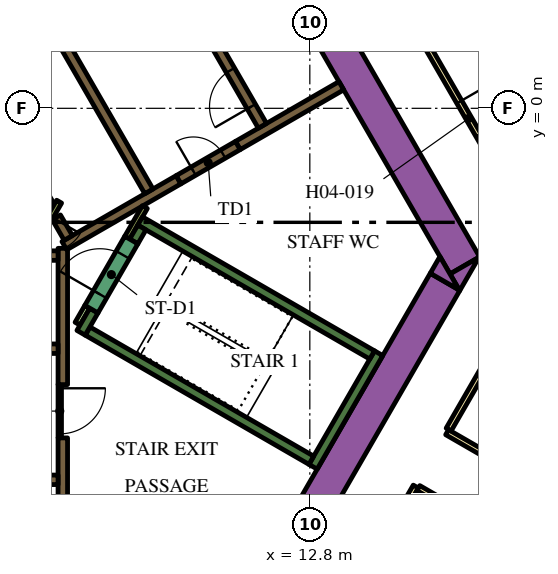
"""IFC4 building model, lengths in metres.
Left out: names, types, materials, properties, quantities, classifications, styles, units other than length and angle.
Written with IfcOpenShell. Run it as: python <this file> out.ifc"""

import sys

from ifc_helpers import new_model, si_unit, direction, frame, frame_2d, origin, place, context, subcontext, project, spatial, polyline, rectangle, outline, extrude, element, fill, save


model = new_model("IFC4")
c1 = context("Model", 3, precision=1e-05, world=origin(), true_north=direction((0.0, 1.0)))
c2 = subcontext(c1, "Body", "Model", "MODEL_VIEW")
j1 = project(units=[si_unit("LENGTHUNIT", "METRE"), si_unit("PLANEANGLEUNIT", "RADIAN")], contexts=[c1])
p1 = place(None, origin())
s1 = spatial("IfcSite", under=j1, at=p1, CompositionType="ELEMENT")
p2 = place(p1, origin())
s2 = spatial("IfcBuilding", under=s1, at=p2, CompositionType="ELEMENT")
p3 = place(p2, frame((0.0, 0.0, 70.5)))
s3 = spatial("IfcBuildingStorey", under=s2, at=p3, CompositionType="ELEMENT", Elevation=70.5)
p4 = place(p3, frame((6.461, 13.909, 0.0), z_axis=(0.0, 0.0, 1.0), x_axis=(0.500005804227, -0.866022052686, 0.0)))
e1 = element("IfcWall", 1, at=p4, inside=s3, PredefinedType="SOLIDWALL", context=c2, shape_type="SweptSolid", body=[
    extrude(rectangle(XDim=20.834, YDim=0.9, at=frame_2d((10.417, 0.0))), origin(), (0.0, 0.0, 1.0), 3.9),
])
p5 = place(p3, origin())
e2 = element("IfcWall", 2, at=p5, inside=s3, PredefinedType="SOLIDWALL", context=c2, shape_type="SweptSolid", body=[
    extrude(outline(polyline([(16.743, -4.8), (16.489, -4.36), (17.251, -3.92), (16.743, -4.8)])), origin(), (0.0, 0.0, 1.0), 3.9),
])
p6 = place(p3, frame((11.695, -12.644, 0.0), z_axis=(0.0, 0.0, 1.0), x_axis=(0.500010229568, 0.86601949766, 0.0)))
e3 = element("IfcWall", 3, at=p6, inside=s3, PredefinedType="SOLIDWALL", context=c2, shape_type="SweptSolid", body=[
    extrude(rectangle(XDim=9.326, YDim=0.9, at=frame_2d((4.663, 0.0))), origin(), (0.0, 0.0, 1.0), 3.9),
])
e4 = element("IfcWall", 4, at=p5, inside=s3, PredefinedType="SOLIDWALL", context=c2, shape_type="SweptSolid", body=[
    extrude(outline(polyline([(16.223, -3.9), (16.732, -4.78), (15.969, -4.34), (16.223, -3.9)])), origin(), (0.0, 0.0, 1.0), 3.9),
])
p7 = place(p3, frame((12.885, -9.431, 0.0), z_axis=(0.0, 0.0, 1.0), x_axis=(0.500020560727, 0.866013532718, 0.0)))
e5 = element("IfcWall", 5, at=p7, inside=s3, PredefinedType="SOLIDWALL", context=c2, shape_type="SweptSolid", body=[
    extrude(rectangle(XDim=3.45, YDim=0.25, at=frame_2d((1.725, 0.0))), origin(), (0.0, 0.0, 1.0), 3.9),
])
p8 = place(p3, frame((12.84, -9.261, 0.0), z_axis=(0.0, 0.0, 1.0), x_axis=(-0.866013990052, 0.500019768644, 0.0)))
e6 = element("IfcWall", 6, at=p8, inside=s3, PredefinedType="SOLIDWALL", context=c2, shape_type="SweptSolid", body=[
    extrude(rectangle(XDim=6.8, YDim=0.25, at=frame_2d((3.4, 0.0))), origin(), (0.0, 0.0, 1.0), 3.9),
])
p9 = place(p3, frame((6.78, -5.906, 0.0), z_axis=(0.0, 0.0, 1.0), x_axis=(0.500223362819, 0.865896406789, 0.0)))
e7 = element("IfcWall", 7, at=p9, inside=s3, PredefinedType="SOLIDWALL", context=c2, shape_type="SweptSolid", body=[
    extrude(rectangle(XDim=0.675, YDim=0.25, at=frame_2d((0.337, 0.0))), origin(), (0.0, 0.0, 1.0), 3.9),
])
p10 = place(p3, frame((8.334, -2.964, 0.0), z_axis=(0.0, 0.0, 1.0), x_axis=(0.866016039709, -0.500016218704, 0.0)))
e8 = element("IfcWall", 8, at=p10, inside=s3, PredefinedType="SOLIDWALL", context=c2, shape_type="SweptSolid", body=[
    extrude(rectangle(XDim=7.05, YDim=0.25, at=frame_2d((3.525, 0.0))), origin(), (0.0, 0.0, 1.0), 3.9),
])
p11 = place(p3, frame((8.168, -3.503, 0.0), z_axis=(0.0, 0.0, 1.0), x_axis=(0.49972245349, 0.866185586049, 0.0)))
e9 = element("IfcWall", 9, at=p11, inside=s3, PredefinedType="SOLIDWALL", context=c2, shape_type="SweptSolid", body=[
    extrude(rectangle(XDim=0.425, YDim=0.25, at=frame_2d((0.212, 0.0))), origin(), (0.0, 0.0, 1.0), 3.9),
])
p12 = place(p3, frame((6.3, -7.27, 0.0), z_axis=(0.0, 0.0, 1.0), x_axis=(0.0, 1.0, 0.0)))
e10 = element("IfcWall", 10, at=p12, inside=s3, PredefinedType="SOLIDWALL", context=c2, shape_type="SweptSolid", body=[
    extrude(rectangle(XDim=3.586, YDim=0.25, at=frame_2d((1.793, 0.0))), origin(), (0.0, 0.0, 1.0), 3.9),
])
p13 = place(p3, frame((6.3, -12.1, 0.0), z_axis=(0.0, 0.0, 1.0), x_axis=(0.0, 1.0, 0.0)))
e11 = element("IfcWall", 11, at=p13, inside=s3, PredefinedType="SOLIDWALL", context=c2, shape_type="SweptSolid", body=[
    extrude(rectangle(XDim=3.428, YDim=0.25, at=frame_2d((1.714, 0.0))), origin(), (0.0, 0.0, 1.0), 3.9),
])
p14 = place(p3, frame((5.538, -3.875, 0.0), z_axis=(0.0, 0.0, 1.0), x_axis=(1.0, 0.0, 0.0)))
e12 = element("IfcWall", 12, at=p14, inside=s3, PredefinedType="SOLIDWALL", context=c2, shape_type="SweptSolid", body=[
    extrude(rectangle(XDim=0.637, YDim=0.25, at=frame_2d((0.318, 0.0))), origin(), (0.0, 0.0, 1.0), 3.9),
])
p15 = place(p3, frame((13.629, 0.594, 0.0), z_axis=(0.0, 0.0, 1.0), x_axis=(-0.86602790099, -0.499995674689, 0.0)))
e13 = element("IfcWall", 13, at=p15, inside=s3, PredefinedType="SOLIDWALL", context=c2, shape_type="SweptSolid", body=[
    extrude(rectangle(XDim=3.146, YDim=0.25, at=frame_2d((1.573, 0.0))), origin(), (0.0, 0.0, 1.0), 3.9),
])
p16 = place(p3, frame((9.346, -1.879, 0.0), z_axis=(0.0, 0.0, 1.0), x_axis=(-0.866048528039, -0.499959945477, 0.0)))
e14 = element("IfcWall", 14, at=p16, inside=s3, PredefinedType="SOLIDWALL", context=c2, shape_type="SweptSolid", body=[
    extrude(rectangle(XDim=3.47, YDim=0.25, at=frame_2d((1.735, 0.0))), origin(), (0.0, 0.0, 1.0), 3.9),
])
p17 = place(p3, frame((6.13, -2.867, 0.0), z_axis=(0.0, 0.0, 1.0), x_axis=(0.500160776593, -0.865932559475, 0.0)))
e15 = element("IfcWall", 15, at=p17, inside=s3, PredefinedType="SOLIDWALL", context=c2, shape_type="SweptSolid", body=[
    extrude(rectangle(XDim=0.627, YDim=0.25, at=frame_2d((0.313, 0.0))), origin(), (0.0, 0.0, 1.0), 3.9),
])
p18 = place(p3, frame((5.97, -2.591, 0.0), z_axis=(0.0, 0.0, 1.0), x_axis=(-0.499994469932, 0.866028596547, 0.0)))
e16 = element("IfcWall", 16, at=p18, inside=s3, PredefinedType="SOLIDWALL", context=c2, shape_type="SweptSolid", body=[
    extrude(rectangle(XDim=10.488, YDim=0.25, at=frame_2d((5.244, 0.0))), origin(), (0.0, 0.0, 1.0), 3.9),
])
p19 = place(p3, frame((6.945, -5.222, 0.0), z_axis=(0.0, 0.0, 1.0), x_axis=(-0.499818422106, -0.866130212453, 0.0)))
e17 = element("IfcWall", 17, at=p19, inside=s3, PredefinedType="PARTITIONING", context=c2, shape_type="SweptSolid", body=[
    extrude(rectangle(XDim=0.514, YDim=0.15, at=frame_2d((0.257, 0.0))), origin(), (0.0, 0.0, 1.0), 2.75),
])
p20 = place(p3, frame((8.459, -2.599, 0.0), z_axis=(0.0, 0.0, 1.0), x_axis=(-0.500041054325, -0.866001699761, 0.0)))
e18 = element("IfcWall", 18, at=p20, inside=s3, PredefinedType="PARTITIONING", context=c2, shape_type="SweptSolid", body=[
    extrude(rectangle(XDim=0.929, YDim=0.15, at=frame_2d((0.464, 0.0))), origin(), (0.0, 0.0, 1.0), 3.9),
])
p21 = place(p3, frame((-6.175, -9.775, 0.0), z_axis=(0.0, 0.0, 1.0), x_axis=(1.0, 0.0, 0.0)))
e19 = element("IfcWall", 19, at=p21, inside=s3, PredefinedType="SOLIDWALL", context=c2, shape_type="SweptSolid", body=[
    extrude(rectangle(XDim=12.35, YDim=0.25, at=frame_2d((6.175, 0.0))), origin(), (0.0, 0.0, 1.0), 3.9),
])
p22 = place(p21, frame((0.585, 0.0, 0.0)))
e20 = element("IfcOpeningElement", 20, at=p22, cuts=e19, PredefinedType="OPENING", context=c2, shape_type="SweptSolid", body=[
    extrude(rectangle(XDim=1.1, YDim=2.1, at=frame_2d((0.55, 1.05))), frame((0.0, 0.135, 0.0), z_axis=(0.0, -1.0, 0.0), x_axis=(1.0, 0.0, 0.0)), (0.0, 0.0, 1.0), 0.27),
])
p23 = place(p21, frame((3.105, 0.0, 0.0)))
e21 = element("IfcOpeningElement", 21, at=p23, cuts=e19, PredefinedType="OPENING", context=c2, shape_type="SweptSolid", body=[
    extrude(rectangle(XDim=1.1, YDim=2.1, at=frame_2d((0.55, 1.05))), frame((0.0, 0.135, 0.0), z_axis=(0.0, -1.0, 0.0), x_axis=(1.0, 0.0, 0.0)), (0.0, 0.0, 1.0), 0.27),
])
p24 = place(p21, frame((5.625, 0.0, 0.0)))
e22 = element("IfcOpeningElement", 22, at=p24, cuts=e19, PredefinedType="OPENING", context=c2, shape_type="SweptSolid", body=[
    extrude(rectangle(XDim=1.1, YDim=2.1, at=frame_2d((0.55, 1.05))), frame((0.0, 0.135, 0.0), z_axis=(0.0, -1.0, 0.0), x_axis=(1.0, 0.0, 0.0)), (0.0, 0.0, 1.0), 0.27),
])
p25 = place(p21, frame((8.145, 0.0, 0.0)))
e23 = element("IfcOpeningElement", 23, at=p25, cuts=e19, PredefinedType="OPENING", context=c2, shape_type="SweptSolid", body=[
    extrude(rectangle(XDim=1.1, YDim=2.1, at=frame_2d((0.55, 1.05))), frame((0.0, 0.135, 0.0), z_axis=(0.0, -1.0, 0.0), x_axis=(1.0, 0.0, 0.0)), (0.0, 0.0, 1.0), 0.27),
])
p26 = place(p21, frame((10.665, 0.0, 0.0)))
e24 = element("IfcOpeningElement", 24, at=p26, cuts=e19, PredefinedType="OPENING", context=c2, shape_type="SweptSolid", body=[
    extrude(rectangle(XDim=1.1, YDim=2.1, at=frame_2d((0.55, 1.05))), frame((0.0, 0.135, 0.0), z_axis=(0.0, -1.0, 0.0), x_axis=(1.0, 0.0, 0.0)), (0.0, 0.0, 1.0), 0.27),
])
p27 = place(p3, frame((-6.175, -6.325, 0.0), z_axis=(0.0, 0.0, 1.0), x_axis=(1.0, 0.0, 0.0)))
e25 = element("IfcWall", 25, at=p27, inside=s3, PredefinedType="SOLIDWALL", context=c2, shape_type="SweptSolid", body=[
    extrude(rectangle(XDim=12.35, YDim=0.25, at=frame_2d((6.175, 0.0))), origin(), (0.0, 0.0, 1.0), 3.9),
])
p28 = place(p27, frame((3.205, 0.0, 0.0)))
e26 = element("IfcOpeningElement", 26, at=p28, cuts=e25, PredefinedType="OPENING", context=c2, shape_type="SweptSolid", body=[
    extrude(rectangle(XDim=0.9, YDim=2.1, at=frame_2d((0.45, 1.05))), frame((0.0, 0.135, 0.0), z_axis=(0.0, -1.0, 0.0), x_axis=(1.0, 0.0, 0.0)), (0.0, 0.0, 1.0), 0.27),
])
p29 = place(p27, frame((8.145, 0.0, 0.0)))
e27 = element("IfcOpeningElement", 27, at=p29, cuts=e25, PredefinedType="OPENING", context=c2, shape_type="SweptSolid", body=[
    extrude(rectangle(XDim=1.1, YDim=2.1, at=frame_2d((0.55, 1.05))), frame((0.0, 0.135, 0.0), z_axis=(0.0, -1.0, 0.0), x_axis=(1.0, 0.0, 0.0)), (0.0, 0.0, 1.0), 0.27),
])
p30 = place(p27, frame((10.665, 0.0, 0.0)))
e28 = element("IfcOpeningElement", 28, at=p30, cuts=e25, PredefinedType="OPENING", context=c2, shape_type="SweptSolid", body=[
    extrude(rectangle(XDim=1.1, YDim=2.1, at=frame_2d((0.55, 1.05))), frame((0.0, 0.135, 0.0), z_axis=(0.0, -1.0, 0.0), x_axis=(1.0, 0.0, 0.0)), (0.0, 0.0, 1.0), 0.27),
])
p31 = place(p3, frame((11.553, -0.46, 0.0), z_axis=(0.0, 0.0, 1.0), x_axis=(-0.500006514828, 0.866021642414, 0.0)))
e29 = element("IfcWall", 29, at=p31, inside=s3, PredefinedType="SOLIDWALL", context=c2, shape_type="SweptSolid", body=[
    extrude(rectangle(XDim=12.35, YDim=0.25, at=frame_2d((6.175, 0.0))), origin(), (0.0, 0.0, 1.0), 3.9),
])
p32 = place(p31, frame((0.585, 0.0, 0.0)))
e30 = element("IfcOpeningElement", 30, at=p32, cuts=e29, PredefinedType="OPENING", context=c2, shape_type="SweptSolid", body=[
    extrude(rectangle(XDim=1.1, YDim=2.1, at=frame_2d((0.55, 1.05))), frame((0.0, 0.135, 0.0), z_axis=(0.0, -1.0, 0.0), x_axis=(1.0, 0.0, 0.0)), (0.0, 0.0, 1.0), 0.27),
])
p33 = place(p31, frame((3.105, 0.0, 0.0)))
e31 = element("IfcOpeningElement", 31, at=p33, cuts=e29, PredefinedType="OPENING", context=c2, shape_type="SweptSolid", body=[
    extrude(rectangle(XDim=1.1, YDim=2.1, at=frame_2d((0.55, 1.05))), frame((0.0, 0.135, 0.0), z_axis=(0.0, -1.0, 0.0), x_axis=(1.0, 0.0, 0.0)), (0.0, 0.0, 1.0), 0.27),
])
p34 = place(p31, frame((5.625, 0.0, 0.0)))
e32 = element("IfcOpeningElement", 32, at=p34, cuts=e29, PredefinedType="OPENING", context=c2, shape_type="SweptSolid", body=[
    extrude(rectangle(XDim=1.1, YDim=2.1, at=frame_2d((0.55, 1.05))), frame((0.0, 0.135, 0.0), z_axis=(0.0, -1.0, 0.0), x_axis=(1.0, 0.0, 0.0)), (0.0, 0.0, 1.0), 0.27),
])
p35 = place(p3, frame((8.565, -2.185, 0.0), z_axis=(0.0, 0.0, 1.0), x_axis=(-0.499997954832, 0.866026584559, 0.0)))
e33 = element("IfcWall", 33, at=p35, inside=s3, PredefinedType="SOLIDWALL", context=c2, shape_type="SweptSolid", body=[
    extrude(rectangle(XDim=12.35, YDim=0.25, at=frame_2d((6.175, 0.0))), origin(), (0.0, 0.0, 1.0), 3.9),
])
p36 = place(p35, frame((5.725, 0.0, 0.0)))
e34 = element("IfcOpeningElement", 34, at=p36, cuts=e33, PredefinedType="OPENING", context=c2, shape_type="SweptSolid", body=[
    extrude(rectangle(XDim=0.9, YDim=2.1, at=frame_2d((0.45, 1.05))), frame((0.0, 0.135, 0.0), z_axis=(0.0, -1.0, 0.0), x_axis=(1.0, 0.0, 0.0)), (0.0, 0.0, 1.0), 0.27),
])
p37 = place(p3, frame((7.053, -5.284, 0.0), z_axis=(0.0, 0.0, 1.0), x_axis=(0.500078061341, 0.865980330357, 0.0)))
e35 = element("IfcWall", 35, at=p37, inside=s3, PredefinedType="SOLIDWALL", context=c2, shape_type="SweptSolid", body=[
    extrude(rectangle(XDim=2.1, YDim=0.4, at=frame_2d((1.05, 0.0))), origin(), (0.0, 0.0, 1.0), 3.9),
])
p38 = place(p37, frame((0.45, 0.0, 0.0)))
e36 = element("IfcOpeningElement", 36, at=p38, cuts=e35, PredefinedType="OPENING", context=c2, shape_type="SweptSolid", body=[
    extrude(rectangle(XDim=1.2, YDim=2.1, at=frame_2d((0.6, 1.05))), frame((0.0, 0.21, 0.0), z_axis=(0.0, -1.0, 0.0), x_axis=(1.0, 0.0, 0.0)), (0.0, 0.0, 1.0), 0.42),
])
p39 = place(p3, frame((9.346, -1.879, 0.0), z_axis=(0.0, 0.0, 1.0), x_axis=(0.866047807691, 0.499961193289, 0.0)))
e37 = element("IfcWall", 37, at=p39, inside=s3, PredefinedType="SOLIDWALL", context=c2, shape_type="SweptSolid", body=[
    extrude(rectangle(XDim=1.8, YDim=0.25, at=frame_2d((0.9, 0.0))), origin(), (0.0, 0.0, 1.0), 3.9),
])
p40 = place(p39, frame((0.45, 0.0, 0.0)))
e38 = element("IfcOpeningElement", 38, at=p40, cuts=e37, PredefinedType="OPENING", context=c2, shape_type="SweptSolid", body=[
    extrude(rectangle(XDim=0.9, YDim=2.1, at=frame_2d((0.45, 1.05))), frame((0.0, 0.135, 0.0), z_axis=(0.0, -1.0, 0.0), x_axis=(1.0, 0.0, 0.0)), (0.0, 0.0, 1.0), 0.27),
])
p41 = place(p3, frame((6.203, -2.456, 0.0), z_axis=(0.0, 0.0, 1.0), x_axis=(-0.500043961785, -0.866000020948, 0.0)))
e39 = element("IfcWall", 39, at=p41, inside=s3, PredefinedType="PARTITIONING", context=c2, shape_type="SweptSolid", body=[
    extrude(rectangle(XDim=1.95, YDim=0.15, at=frame_2d((0.975, 0.0))), origin(), (0.0, 0.0, 1.0), 3.9),
])
p42 = place(p41, frame((0.45, 0.0, 0.0)))
e40 = element("IfcOpeningElement", 40, at=p42, cuts=e39, PredefinedType="OPENING", context=c2, shape_type="SweptSolid", body=[
    extrude(rectangle(XDim=0.9, YDim=2.1, at=frame_2d((0.45, 1.05))), frame((0.0, 0.085, 0.0), z_axis=(0.0, -1.0, 0.0), x_axis=(1.0, 0.0, 0.0)), (0.0, 0.0, 1.0), 0.17),
])
p43 = place(p3, frame((6.22, -7.266, 0.0), z_axis=(0.0, 0.0, 1.0), x_axis=(0.0, -1.0, 0.0)))
e41 = element("IfcWall", 41, at=p43, inside=s3, PredefinedType="PARTITIONING", context=c2, shape_type="SweptSolid", body=[
    extrude(rectangle(XDim=1.4, YDim=0.09, at=frame_2d((0.7, 0.0))), origin(), (0.0, 0.0, 1.0), 2.75),
])
p44 = place(p43, frame((0.1, 0.0, 0.0)))
e42 = element("IfcOpeningElement", 42, at=p44, cuts=e41, PredefinedType="OPENING", context=c2, shape_type="SweptSolid", body=[
    extrude(rectangle(XDim=1.2, YDim=2.1, at=frame_2d((0.6, 1.05))), frame((0.0, 0.055, 0.0), z_axis=(0.0, -1.0, 0.0), x_axis=(1.0, 0.0, 0.0)), (0.0, 0.0, 1.0), 0.11),
])
p45 = place(p3, frame((16.412, -8.523, 0.0), z_axis=(0.0, 0.0, 1.0), x_axis=(0.866022197818, -0.500005552856, 0.0)))
e43 = element("IfcWall", 43, at=p45, inside=s3, PredefinedType="PARTITIONING", context=c2, shape_type="SweptSolid", body=[
    extrude(rectangle(XDim=16.224, YDim=0.15, at=frame_2d((8.112, 0.0))), origin(), (0.0, 0.0, 1.0), 2.75),
])
p46 = place(p45, frame((4.223, 0.0, 0.0)))
e44 = element("IfcOpeningElement", 44, at=p46, cuts=e43, PredefinedType="OPENING", context=c2, shape_type="SweptSolid", body=[
    extrude(rectangle(XDim=1.0, YDim=2.1, at=frame_2d((0.5, 1.05))), frame((0.0, 0.085, 0.0), z_axis=(0.0, -1.0, 0.0), x_axis=(1.0, 0.0, 0.0)), (0.0, 0.0, 1.0), 0.17),
])
p47 = place(p3, frame((19.081, -3.9, 0.0), z_axis=(0.0, 0.0, 1.0), x_axis=(-0.499974327079, -0.866040225545, 0.0)))
e45 = element("IfcWall", 45, at=p47, inside=s3, PredefinedType="PARTITIONING", context=c2, shape_type="SweptSolid", body=[
    extrude(rectangle(XDim=5.258, YDim=0.15, at=frame_2d((2.629, 0.0))), origin(), (0.0, 0.0, 1.0), 2.75),
])
p48 = place(p47, frame((0.18, 0.0, 0.0)))
e46 = element("IfcOpeningElement", 46, at=p48, cuts=e45, PredefinedType="OPENING", context=c2, shape_type="SweptSolid", body=[
    extrude(rectangle(XDim=1.0, YDim=2.1, at=frame_2d((0.5, 1.05))), frame((0.0, 0.085, 0.0), z_axis=(0.0, -1.0, 0.0), x_axis=(1.0, 0.0, 0.0)), (0.0, 0.0, 1.0), 0.17),
])
p49 = place(p3, frame((6.163, 18.475, 0.0), z_axis=(0.0, 0.0, 1.0), x_axis=(0.500001317485, -0.866024643133, 0.0)))
e47 = element("IfcWall", 47, at=p49, inside=s3, PredefinedType="PARTITIONING", context=c2, shape_type="SweptSolid", body=[
    extrude(rectangle(XDim=25.767, YDim=0.15, at=frame_2d((12.883, 0.0))), origin(), (0.0, 0.0, 1.0), 2.75),
])
p50 = place(p49, frame((21.138, 0.0, 0.0)))
e48 = element("IfcOpeningElement", 48, at=p50, cuts=e47, PredefinedType="OPENING", context=c2, shape_type="SweptSolid", body=[
    extrude(rectangle(XDim=1.0, YDim=2.1, at=frame_2d((0.5, 1.05))), frame((0.0, 0.085, 0.0), z_axis=(0.0, -1.0, 0.0), x_axis=(1.0, 0.0, 0.0)), (0.0, 0.0, 1.0), 0.17),
])
p51 = place(p49, frame((9.948, 0.0, 0.0)))
e49 = element("IfcOpeningElement", 49, at=p51, cuts=e47, PredefinedType="OPENING", context=c2, shape_type="SweptSolid", body=[
    extrude(rectangle(XDim=1.1, YDim=2.1, at=frame_2d((0.55, 1.05))), frame((0.0, 0.085, 0.0), z_axis=(0.0, -1.0, 0.0), x_axis=(1.0, 0.0, 0.0)), (0.0, 0.0, 1.0), 0.17),
])
p52 = place(p49, frame((8.641, 0.0, 0.0)))
e50 = element("IfcOpeningElement", 50, at=p52, cuts=e47, PredefinedType="OPENING", context=c2, shape_type="SweptSolid", body=[
    extrude(rectangle(XDim=1.0, YDim=2.1, at=frame_2d((0.5, 1.05))), frame((0.0, 0.085, 0.0), z_axis=(0.0, -1.0, 0.0), x_axis=(1.0, 0.0, 0.0)), (0.0, 0.0, 1.0), 0.17),
])
p53 = place(p49, frame((0.18, 0.0, 0.0)))
e51 = element("IfcOpeningElement", 51, at=p53, cuts=e47, PredefinedType="OPENING", context=c2, shape_type="SweptSolid", body=[
    extrude(rectangle(XDim=1.0, YDim=2.1, at=frame_2d((0.5, 1.05))), frame((0.0, 0.085, 0.0), z_axis=(0.0, -1.0, 0.0), x_axis=(1.0, 0.0, 0.0)), (0.0, 0.0, 1.0), 0.17),
])
p54 = place(p3, frame((15.587, -9.952, 0.0), z_axis=(0.0, 0.0, 1.0), x_axis=(-0.500016618951, -0.866015808616, 0.0)))
e52 = element("IfcWall", 52, at=p54, inside=s3, PredefinedType="PARTITIONING", context=c2, shape_type="SweptSolid", body=[
    extrude(rectangle(XDim=5.268, YDim=0.15, at=frame_2d((2.634, 0.0))), origin(), (0.0, 0.0, 1.0), 2.75),
])
p55 = place(p3, frame((29.638, -18.064, 0.0), z_axis=(0.0, 0.0, 1.0), x_axis=(-0.866026175601, 0.499998663172, 0.0)))
e53 = element("IfcWall", 53, at=p55, inside=s3, PredefinedType="PARTITIONING", context=c2, shape_type="SweptSolid", body=[
    extrude(rectangle(XDim=16.144, YDim=0.15, at=frame_2d((8.072, 0.0))), origin(), (0.0, 0.0, 1.0), 2.75),
])
p56 = place(p55, frame((14.714, 0.0, 0.0)))
e54 = element("IfcOpeningElement", 54, at=p56, cuts=e53, PredefinedType="OPENING", context=c2, shape_type="SweptSolid", body=[
    extrude(rectangle(XDim=1.0, YDim=2.1, at=frame_2d((0.5, 1.05))), frame((0.0, 0.085, 0.0), z_axis=(0.0, -1.0, 0.0), x_axis=(1.0, 0.0, 0.0)), (0.0, 0.0, 1.0), 0.17),
])
p57 = place(p55, frame((7.275, 0.0, 0.0)))
e55 = element("IfcOpeningElement", 55, at=p57, cuts=e53, PredefinedType="OPENING", context=c2, shape_type="SweptSolid", body=[
    extrude(rectangle(XDim=1.0, YDim=2.1, at=frame_2d((0.5, 1.05))), frame((0.0, 0.085, 0.0), z_axis=(0.0, -1.0, 0.0), x_axis=(1.0, 0.0, 0.0)), (0.0, 0.0, 1.0), 0.17),
])
p58 = place(p32, origin())
e56 = element("IfcDoor", 56, at=p58, inside=s3, OperationType="DOUBLE_DOOR_SLIDING", PredefinedType="DOOR", context=c2, shape_type="SweptSolid", body=[
    extrude(rectangle(XDim=1.1, YDim=2.1, at=frame_2d((0.55, 1.05))), frame((0.0, 0.025, 0.0), z_axis=(0.0, -1.0, 0.0), x_axis=(1.0, 0.0, 0.0)), (0.0, 0.0, 1.0), 0.05),
])
fill(e30, e56)
p59 = place(p38, origin())
e57 = element("IfcDoor", 57, at=p59, inside=s3, OperationType="SINGLE_SWING_LEFT", PredefinedType="DOOR", context=c2, shape_type="SweptSolid", body=[
    extrude(rectangle(XDim=1.2, YDim=2.1, at=frame_2d((0.6, 1.05))), frame((0.0, 0.025, 0.0), z_axis=(0.0, -1.0, 0.0), x_axis=(1.0, 0.0, 0.0)), (0.0, 0.0, 1.0), 0.05),
])
fill(e36, e57)
p60 = place(p40, origin())
e58 = element("IfcDoor", 58, at=p60, inside=s3, OperationType="SINGLE_SWING_LEFT", PredefinedType="DOOR", context=c2, shape_type="SweptSolid", body=[
    extrude(rectangle(XDim=0.9, YDim=2.1, at=frame_2d((0.45, 1.05))), frame((0.0, 0.025, 0.0), z_axis=(0.0, -1.0, 0.0), x_axis=(1.0, 0.0, 0.0)), (0.0, 0.0, 1.0), 0.05),
])
fill(e38, e58)
p61 = place(p44, origin())
e59 = element("IfcDoor", 59, at=p61, inside=s3, OperationType="SINGLE_SWING_LEFT", PredefinedType="DOOR", context=c2, shape_type="SweptSolid", body=[
    extrude(rectangle(XDim=1.2, YDim=2.1, at=frame_2d((0.6, 1.05))), frame((0.0, 0.025, 0.0), z_axis=(0.0, -1.0, 0.0), x_axis=(1.0, 0.0, 0.0)), (0.0, 0.0, 1.0), 0.05),
])
fill(e42, e59)
p62 = place(p50, origin())
e60 = element("IfcDoor", 60, at=p62, inside=s3, OperationType="SINGLE_SWING_RIGHT", PredefinedType="DOOR", context=c2, shape_type="SweptSolid", body=[
    extrude(rectangle(XDim=1.0, YDim=2.1, at=frame_2d((0.5, 1.05))), frame((0.0, 0.025, 0.0), z_axis=(0.0, -1.0, 0.0), x_axis=(1.0, 0.0, 0.0)), (0.0, 0.0, 1.0), 0.05),
])
fill(e48, e60)
save(model, sys.argv[1])
